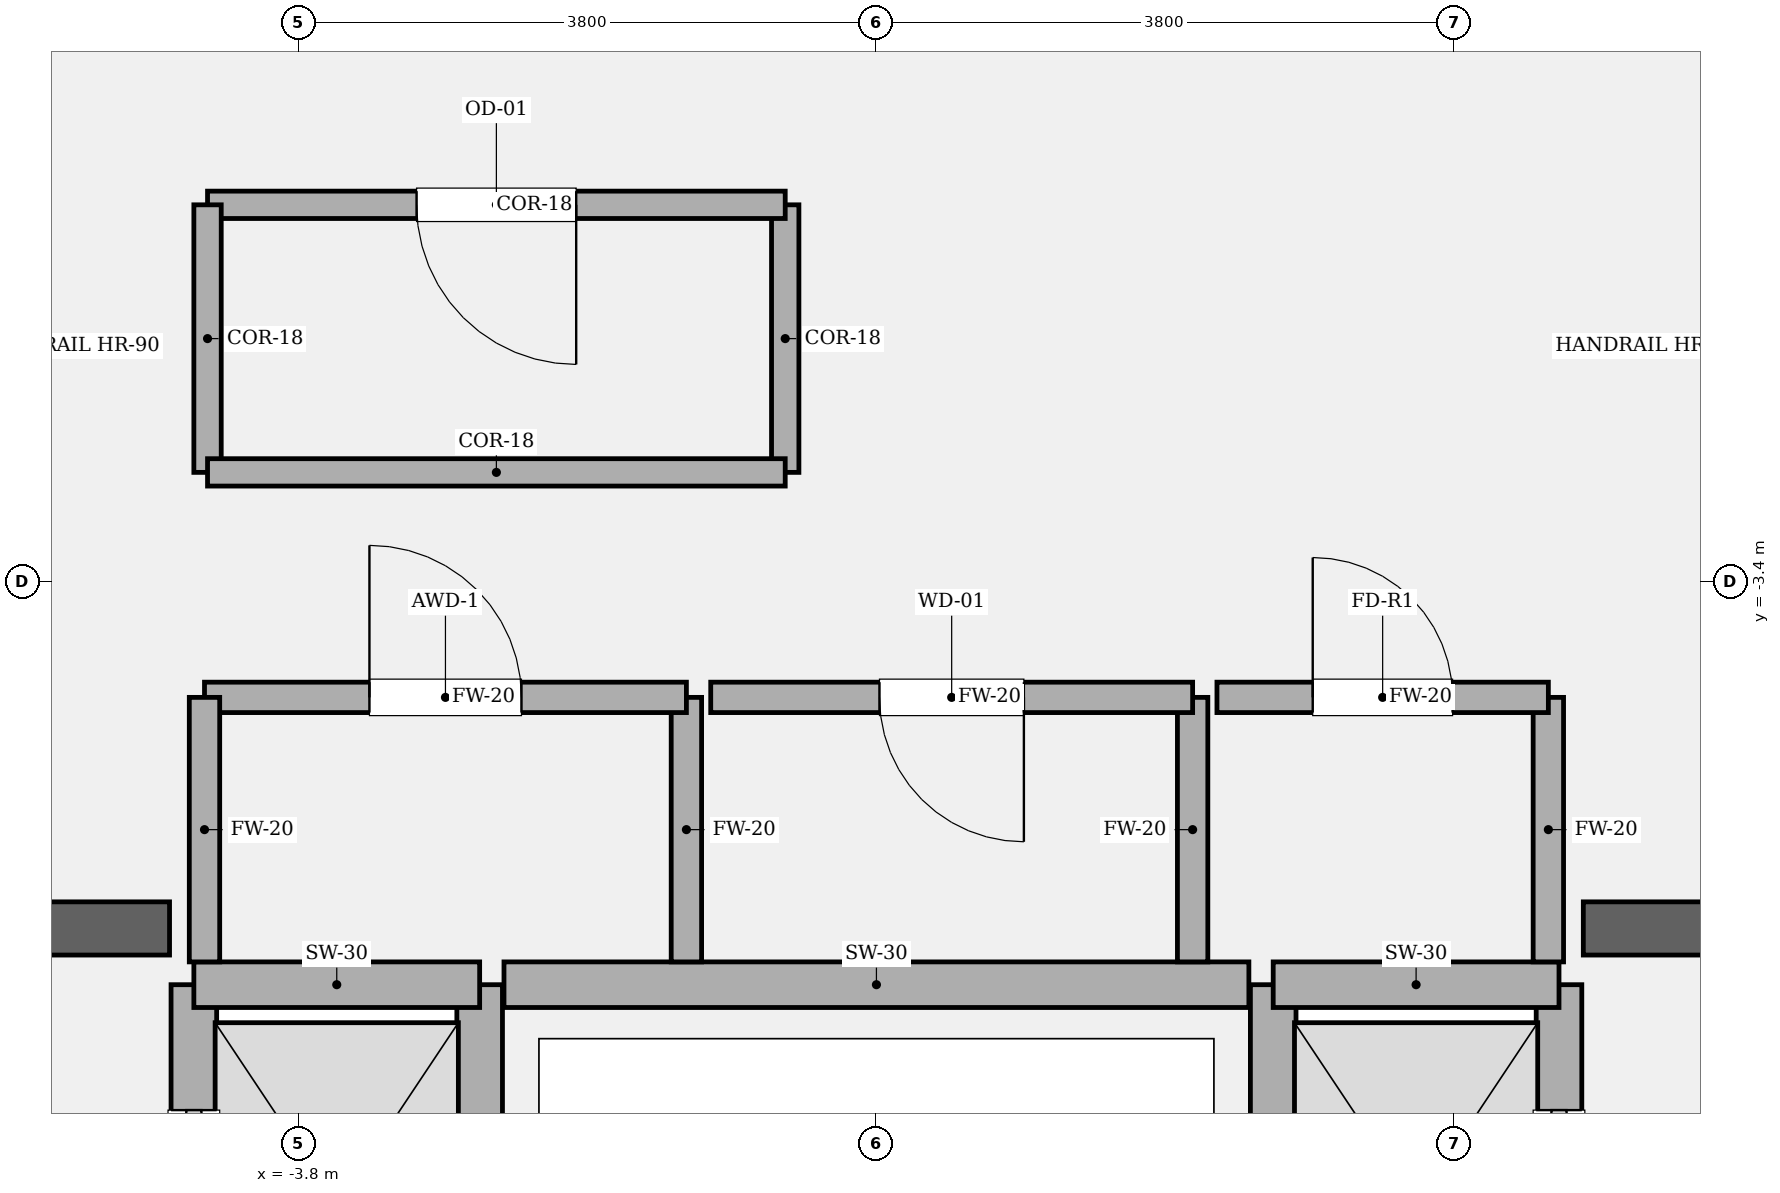
"""IFC4 building model, lengths in metres.
Left out: names, types, materials, properties, quantities, classifications, styles, units other than length and angle.
Written with IfcOpenShell. Run it as: python <this file> out.ifc"""

import sys

from ifc_helpers import new_model, si_unit, direction, frame, frame_2d, origin, place, context, subcontext, project, spatial, rectangle, extrude, element, fill, save


model = new_model("IFC4")
c1 = context("Model", 3, precision=1e-05, world=origin(), true_north=direction((0.0, 1.0)))
c2 = subcontext(c1, "Body", "Model", "MODEL_VIEW")
j1 = project(units=[si_unit("LENGTHUNIT", "METRE"), si_unit("PLANEANGLEUNIT", "RADIAN")], contexts=[c1])
p1 = place(None, origin())
s1 = spatial("IfcSite", under=j1, at=p1, CompositionType="ELEMENT")
p2 = place(p1, origin())
s2 = spatial("IfcBuilding", under=s1, at=p2, CompositionType="ELEMENT")
p3 = place(p2, frame((0.0, 0.0, 139.8)))
s3 = spatial("IfcBuildingStorey", under=s2, at=p3, CompositionType="ELEMENT", Elevation=139.8)
p4 = place(p3, frame((-9.875, -5.68, 0.0), z_axis=(0.0, 0.0, 1.0), x_axis=(1.0, 0.0, 0.0)))
e1 = element("IfcWall", 1, at=p4, inside=s3, PredefinedType="SOLIDWALL", context=c2, shape_type="SweptSolid", body=[
    extrude(rectangle(XDim=5.225, YDim=0.35, at=frame_2d((2.613, 0.0))), origin(), (0.0, 0.0, 1.0), 4.05),
])
p5 = place(p4, frame((1.335, 0.0, 0.0)))
e2 = element("IfcOpeningElement", 2, at=p5, cuts=e1, PredefinedType="OPENING", context=c2, shape_type="SweptSolid", body=[
    extrude(rectangle(XDim=1.18, YDim=2.2, at=frame_2d((0.59, 1.1))), frame((0.0, 0.185, 0.0), z_axis=(0.0, -1.0, 0.0), x_axis=(1.0, 0.0, 0.0)), (0.0, 0.0, 1.0), 0.37),
])
p6 = place(p3, frame((4.65, -5.68, 0.0), z_axis=(0.0, 0.0, 1.0), x_axis=(1.0, 0.0, 0.0)))
e3 = element("IfcWall", 3, at=p6, inside=s3, PredefinedType="SOLIDWALL", context=c2, shape_type="SweptSolid", body=[
    extrude(rectangle(XDim=5.225, YDim=0.35, at=frame_2d((2.613, 0.0))), origin(), (0.0, 0.0, 1.0), 4.05),
])
p7 = place(p6, frame((2.71, 0.0, 0.0)))
e4 = element("IfcOpeningElement", 4, at=p7, cuts=e3, PredefinedType="OPENING", context=c2, shape_type="SweptSolid", body=[
    extrude(rectangle(XDim=1.18, YDim=2.2, at=frame_2d((0.59, 1.1))), frame((0.0, 0.185, 0.0), z_axis=(0.0, -1.0, 0.0), x_axis=(1.0, 0.0, 0.0)), (0.0, 0.0, 1.0), 0.37),
])
p8 = place(p3, frame((-4.49, -8.82, 0.0), z_axis=(0.0, 0.0, 1.0), x_axis=(0.0, 1.0, 0.0)))
e5 = element("IfcWall", 5, at=p8, inside=s3, PredefinedType="SOLIDWALL", context=c2, shape_type="SweptSolid", body=[
    extrude(rectangle(XDim=2.77, YDim=0.3, at=frame_2d((1.385, 0.0))), origin(), (0.0, 0.0, 1.0), 3.83),
])
p9 = place(p8, frame((0.825, 0.0, 0.0)))
e6 = element("IfcOpeningElement", 6, at=p9, cuts=e5, PredefinedType="OPENING", context=c2, shape_type="SweptSolid", body=[
    extrude(rectangle(XDim=1.12, YDim=2.25, at=frame_2d((0.56, 1.125))), frame((0.0, 0.16, 0.0), z_axis=(0.0, -1.0, 0.0), x_axis=(1.0, 0.0, 0.0)), (0.0, 0.0, 1.0), 0.32),
])
p10 = place(p3, frame((-2.61, -8.82, 0.0), z_axis=(0.0, 0.0, 1.0), x_axis=(0.0, 1.0, 0.0)))
e7 = element("IfcWall", 7, at=p10, inside=s3, PredefinedType="SOLIDWALL", context=c2, shape_type="SweptSolid", body=[
    extrude(rectangle(XDim=2.77, YDim=0.3, at=frame_2d((1.385, 0.0))), origin(), (0.0, 0.0, 1.0), 3.83),
])
p11 = place(p3, frame((-4.49, -6.05, 0.0), z_axis=(0.0, 0.0, 1.0), x_axis=(1.0, 0.0, 0.0)))
e8 = element("IfcWall", 8, at=p11, inside=s3, PredefinedType="SOLIDWALL", context=c2, shape_type="SweptSolid", body=[
    extrude(rectangle(XDim=1.88, YDim=0.3, at=frame_2d((0.94, 0.0))), origin(), (0.0, 0.0, 1.0), 3.83),
])
p12 = place(p3, frame((4.49, -8.82, 0.0), z_axis=(0.0, 0.0, 1.0), x_axis=(0.0, 1.0, 0.0)))
e9 = element("IfcWall", 9, at=p12, inside=s3, PredefinedType="SOLIDWALL", context=c2, shape_type="SweptSolid", body=[
    extrude(rectangle(XDim=2.77, YDim=0.3, at=frame_2d((1.385, 0.0))), origin(), (0.0, 0.0, 1.0), 3.83),
])
p13 = place(p12, frame((0.825, 0.0, 0.0)))
e10 = element("IfcOpeningElement", 10, at=p13, cuts=e9, PredefinedType="OPENING", context=c2, shape_type="SweptSolid", body=[
    extrude(rectangle(XDim=1.12, YDim=2.25, at=frame_2d((0.56, 1.125))), frame((0.0, 0.16, 0.0), z_axis=(0.0, -1.0, 0.0), x_axis=(1.0, 0.0, 0.0)), (0.0, 0.0, 1.0), 0.32),
])
p14 = place(p3, frame((2.61, -8.82, 0.0), z_axis=(0.0, 0.0, 1.0), x_axis=(0.0, 1.0, 0.0)))
e11 = element("IfcWall", 11, at=p14, inside=s3, PredefinedType="SOLIDWALL", context=c2, shape_type="SweptSolid", body=[
    extrude(rectangle(XDim=2.77, YDim=0.3, at=frame_2d((1.385, 0.0))), origin(), (0.0, 0.0, 1.0), 3.83),
])
p15 = place(p3, frame((2.61, -6.05, 0.0), z_axis=(0.0, 0.0, 1.0), x_axis=(1.0, 0.0, 0.0)))
e12 = element("IfcWall", 12, at=p15, inside=s3, PredefinedType="SOLIDWALL", context=c2, shape_type="SweptSolid", body=[
    extrude(rectangle(XDim=1.88, YDim=0.3, at=frame_2d((0.94, 0.0))), origin(), (0.0, 0.0, 1.0), 3.83),
])
p16 = place(p3, frame((-2.45, -6.05, 0.0), z_axis=(0.0, 0.0, 1.0), x_axis=(1.0, 0.0, 0.0)))
e13 = element("IfcWall", 13, at=p16, inside=s3, PredefinedType="SOLIDWALL", context=c2, shape_type="SweptSolid", body=[
    extrude(rectangle(XDim=4.9, YDim=0.3, at=frame_2d((2.45, 0.0))), origin(), (0.0, 0.0, 1.0), 3.83),
])
p17 = place(p3, frame((-1.25, -5.9, 0.0), z_axis=(0.0, 0.0, 1.0), x_axis=(0.0, 1.0, 0.0)))
e14 = element("IfcWall", 14, at=p17, inside=s3, PredefinedType="SOLIDWALL", context=c2, shape_type="SweptSolid", body=[
    extrude(rectangle(XDim=1.74, YDim=0.2, at=frame_2d((0.87, 0.0))), origin(), (0.0, 0.0, 1.0), 3.83),
])
p18 = place(p3, frame((-1.25, -4.16, 0.0), z_axis=(0.0, 0.0, 1.0), x_axis=(-1.0, 0.0, 0.0)))
e15 = element("IfcWall", 15, at=p18, inside=s3, PredefinedType="SOLIDWALL", context=c2, shape_type="SweptSolid", body=[
    extrude(rectangle(XDim=3.17, YDim=0.2, at=frame_2d((1.585, 0.0))), origin(), (0.0, 0.0, 1.0), 3.83),
])
p19 = place(p18, frame((1.085, 0.0, 0.0)))
e16 = element("IfcOpeningElement", 16, at=p19, cuts=e15, PredefinedType="OPENING", context=c2, shape_type="SweptSolid", body=[
    extrude(rectangle(XDim=1.0, YDim=2.15, at=frame_2d((0.5, 1.075))), frame((0.0, 0.11, 0.0), z_axis=(0.0, -1.0, 0.0), x_axis=(1.0, 0.0, 0.0)), (0.0, 0.0, 1.0), 0.22),
])
for number, where, z_axis, x_axis in (
    (17, (-4.42, -4.16, 0.0), (0.0, 0.0, 1.0), (0.0, -1.0, 0.0)),
    (18, (2.08, -5.9, 0.0), (0.0, 0.0, 1.0), (0.0, 1.0, 0.0)),
):
    element("IfcWall", number, at=place(p3, frame(where, z_axis=z_axis, x_axis=x_axis)), inside=s3, PredefinedType="SOLIDWALL", context=c2, shape_type="SweptSolid", body=[
        extrude(rectangle(XDim=1.74, YDim=0.2, at=frame_2d((0.87, 0.0))), origin(), (0.0, 0.0, 1.0), 3.83),
    ])
p20 = place(p3, frame((2.08, -4.16, 0.0), z_axis=(0.0, 0.0, 1.0), x_axis=(-1.0, 0.0, 0.0)))
e19 = element("IfcWall", 19, at=p20, inside=s3, PredefinedType="SOLIDWALL", context=c2, shape_type="SweptSolid", body=[
    extrude(rectangle(XDim=3.17, YDim=0.2, at=frame_2d((1.585, 0.0))), origin(), (0.0, 0.0, 1.0), 3.83),
])
p21 = place(p20, frame((1.11, 0.0, 0.0)))
e20 = element("IfcOpeningElement", 20, at=p21, cuts=e19, PredefinedType="OPENING", context=c2, shape_type="SweptSolid", body=[
    extrude(rectangle(XDim=0.95, YDim=2.15, at=frame_2d((0.475, 1.075))), frame((0.0, 0.11, 0.0), z_axis=(0.0, -1.0, 0.0), x_axis=(1.0, 0.0, 0.0)), (0.0, 0.0, 1.0), 0.22),
])
p22 = place(p3, frame((4.42, -5.9, 0.0), z_axis=(0.0, 0.0, 1.0), x_axis=(0.0, 1.0, 0.0)))
e21 = element("IfcWall", 21, at=p22, inside=s3, PredefinedType="SOLIDWALL", context=c2, shape_type="SweptSolid", body=[
    extrude(rectangle(XDim=1.74, YDim=0.2, at=frame_2d((0.87, 0.0))), origin(), (0.0, 0.0, 1.0), 3.83),
])
p23 = place(p3, frame((4.42, -4.16, 0.0), z_axis=(0.0, 0.0, 1.0), x_axis=(-1.0, 0.0, 0.0)))
e22 = element("IfcWall", 22, at=p23, inside=s3, PredefinedType="SOLIDWALL", context=c2, shape_type="SweptSolid", body=[
    extrude(rectangle(XDim=2.18, YDim=0.2, at=frame_2d((1.09, 0.0))), origin(), (0.0, 0.0, 1.0), 3.83),
])
p24 = place(p23, frame((0.63, 0.0, 0.0)))
e23 = element("IfcOpeningElement", 23, at=p24, cuts=e22, PredefinedType="OPENING", context=c2, shape_type="SweptSolid", body=[
    extrude(rectangle(XDim=0.92, YDim=2.1, at=frame_2d((0.46, 1.05))), frame((0.0, 0.11, 0.0), z_axis=(0.0, -1.0, 0.0), x_axis=(1.0, 0.0, 0.0)), (0.0, 0.0, 1.0), 0.22),
])
p25 = place(p3, frame((-0.6, -2.68, 0.0), z_axis=(0.0, 0.0, 1.0), x_axis=(0.0, 1.0, 0.0)))
e24 = element("IfcWall", 24, at=p25, inside=s3, PredefinedType="PARTITIONING", context=c2, shape_type="SweptSolid", body=[
    extrude(rectangle(XDim=1.76, YDim=0.18, at=frame_2d((0.88, 0.0))), origin(), (0.0, 0.0, 1.0), 3.83),
])
p26 = place(p3, frame((-0.6, -0.92, 0.0), z_axis=(0.0, 0.0, 1.0), x_axis=(-1.0, 0.0, 0.0)))
e25 = element("IfcWall", 25, at=p26, inside=s3, PredefinedType="PARTITIONING", context=c2, shape_type="SweptSolid", body=[
    extrude(rectangle(XDim=3.8, YDim=0.18, at=frame_2d((1.9, 0.0))), origin(), (0.0, 0.0, 1.0), 3.83),
])
p27 = place(p26, frame((1.375, 0.0, 0.0)))
e26 = element("IfcOpeningElement", 26, at=p27, cuts=e25, PredefinedType="OPENING", context=c2, shape_type="SweptSolid", body=[
    extrude(rectangle(XDim=1.05, YDim=2.2, at=frame_2d((0.525, 1.1))), frame((0.0, 0.1, 0.0), z_axis=(0.0, -1.0, 0.0), x_axis=(1.0, 0.0, 0.0)), (0.0, 0.0, 1.0), 0.2),
])
p28 = place(p3, frame((-4.4, -0.92, 0.0), z_axis=(0.0, 0.0, 1.0), x_axis=(0.0, -1.0, 0.0)))
e27 = element("IfcWall", 27, at=p28, inside=s3, PredefinedType="PARTITIONING", context=c2, shape_type="SweptSolid", body=[
    extrude(rectangle(XDim=1.76, YDim=0.18, at=frame_2d((0.88, 0.0))), origin(), (0.0, 0.0, 1.0), 3.83),
])
p29 = place(p3, frame((-4.4, -2.68, 0.0), z_axis=(0.0, 0.0, 1.0), x_axis=(1.0, 0.0, 0.0)))
e28 = element("IfcWall", 28, at=p29, inside=s3, PredefinedType="PARTITIONING", context=c2, shape_type="SweptSolid", body=[
    extrude(rectangle(XDim=3.8, YDim=0.18, at=frame_2d((1.9, 0.0))), origin(), (0.0, 0.0, 1.0), 3.83),
])
p30 = place(p9, origin())
e29 = element("IfcDoor", 29, at=p30, inside=s3, OperationType="SLIDING_TO_LEFT", PredefinedType="DOOR", context=c2, shape_type="SweptSolid", body=[
    extrude(rectangle(XDim=1.12, YDim=2.25, at=frame_2d((0.56, 1.125))), frame((0.0, 0.025, 0.0), z_axis=(0.0, -1.0, 0.0), x_axis=(1.0, 0.0, 0.0)), (0.0, 0.0, 1.0), 0.05),
])
fill(e6, e29)
p31 = place(p13, origin())
e30 = element("IfcDoor", 30, at=p31, inside=s3, OperationType="SLIDING_TO_RIGHT", PredefinedType="DOOR", context=c2, shape_type="SweptSolid", body=[
    extrude(rectangle(XDim=1.12, YDim=2.25, at=frame_2d((0.56, 1.125))), frame((0.0, 0.025, 0.0), z_axis=(0.0, -1.0, 0.0), x_axis=(1.0, 0.0, 0.0)), (0.0, 0.0, 1.0), 0.05),
])
fill(e10, e30)
p32 = place(p19, origin())
e31 = element("IfcDoor", 31, at=p32, inside=s3, OperationType="SINGLE_SWING_RIGHT", PredefinedType="DOOR", context=c2, shape_type="SweptSolid", body=[
    extrude(rectangle(XDim=1.0, YDim=2.15, at=frame_2d((0.5, 1.075))), frame((0.0, 0.025, 0.0), z_axis=(0.0, -1.0, 0.0), x_axis=(1.0, 0.0, 0.0)), (0.0, 0.0, 1.0), 0.05),
])
fill(e16, e31)
p33 = place(p21, origin())
e32 = element("IfcDoor", 32, at=p33, inside=s3, OperationType="SINGLE_SWING_LEFT", PredefinedType="DOOR", context=c2, shape_type="SweptSolid", body=[
    extrude(rectangle(XDim=0.95, YDim=2.15, at=frame_2d((0.475, 1.075))), frame((0.0, 0.025, 0.0), z_axis=(0.0, -1.0, 0.0), x_axis=(1.0, 0.0, 0.0)), (0.0, 0.0, 1.0), 0.05),
])
fill(e20, e32)
p34 = place(p24, origin())
e33 = element("IfcDoor", 33, at=p34, inside=s3, OperationType="SINGLE_SWING_RIGHT", PredefinedType="DOOR", context=c2, shape_type="SweptSolid", body=[
    extrude(rectangle(XDim=0.92, YDim=2.1, at=frame_2d((0.46, 1.05))), frame((0.0, 0.025, 0.0), z_axis=(0.0, -1.0, 0.0), x_axis=(1.0, 0.0, 0.0)), (0.0, 0.0, 1.0), 0.05),
])
fill(e23, e33)
p35 = place(p27, origin())
e34 = element("IfcDoor", 34, at=p35, inside=s3, OperationType="SINGLE_SWING_LEFT", PredefinedType="DOOR", context=c2, shape_type="SweptSolid", body=[
    extrude(rectangle(XDim=1.05, YDim=2.2, at=frame_2d((0.525, 1.1))), frame((0.0, 0.025, 0.0), z_axis=(0.0, -1.0, 0.0), x_axis=(1.0, 0.0, 0.0)), (0.0, 0.0, 1.0), 0.05),
])
fill(e26, e34)
save(model, sys.argv[1])
